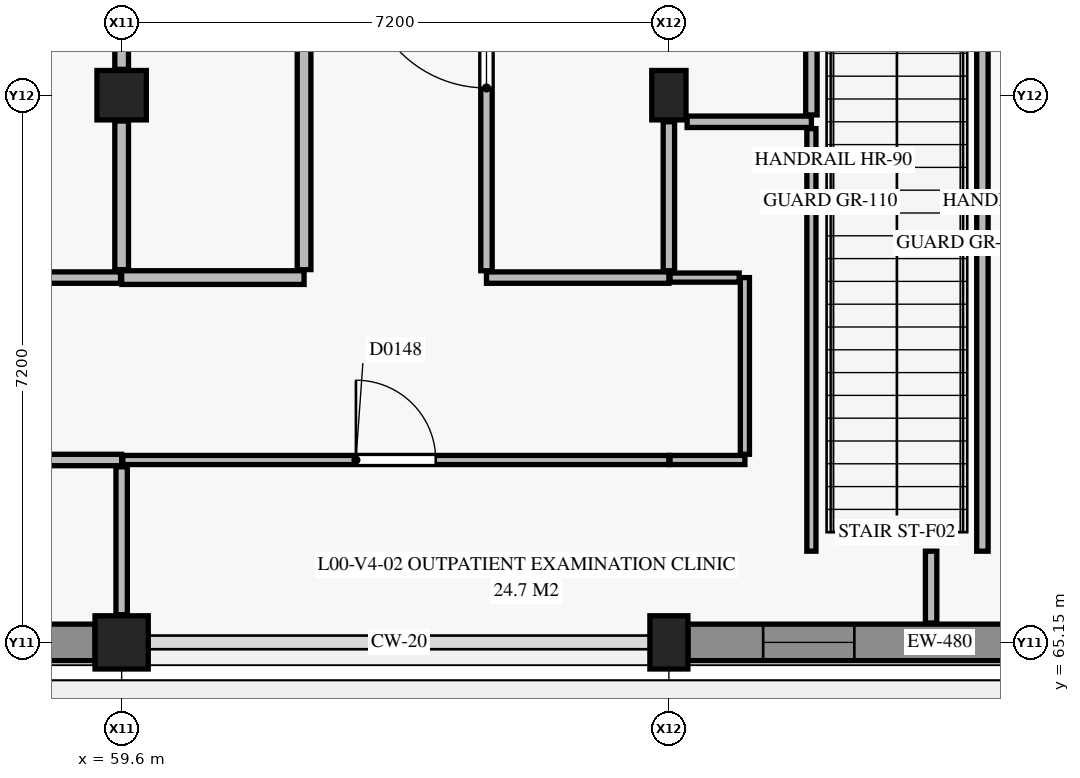
"""IFC4 building model, lengths in metres.
Left out: names, types, materials, properties, quantities, classifications, styles, units other than length and angle.
Written with IfcOpenShell. Run it as: python <this file> out.ifc"""

import sys

from ifc_helpers import new_model, si_unit, direction, frame, frame_2d, origin, origin_2d, place, context, subcontext, project, spatial, rectangle, extrude, element, fill, save


model = new_model("IFC4")
c1 = context("Model", 3, precision=1e-05, world=origin(), true_north=direction((0.0, 1.0)))
c2 = subcontext(c1, "Body", "Model", "MODEL_VIEW")
j1 = project(units=[si_unit("LENGTHUNIT", "METRE"), si_unit("PLANEANGLEUNIT", "RADIAN")], contexts=[c1])
p1 = place(None, origin())
s1 = spatial("IfcSite", under=j1, at=p1, CompositionType="ELEMENT")
p2 = place(p1, origin())
s2 = spatial("IfcBuilding", under=s1, at=p2, CompositionType="ELEMENT")
p3 = place(p2, origin())
s3 = spatial("IfcBuildingStorey", under=s2, at=p3, CompositionType="ELEMENT", Elevation=0.0)
p4 = place(p3, frame((59.6, 65.15, 0.0), z_axis=(0.0, 0.0, 1.0), x_axis=(1.0, 0.0, 0.0)))
e1 = element("IfcColumn", 1, at=p4, inside=s3, PredefinedType="COLUMN", context=c2, shape_type="SweptSolid", body=[
    extrude(rectangle(XDim=0.7, YDim=0.7, at=origin_2d()), origin(), (0.0, 0.0, 1.0), 4.8),
])
p5 = place(p3, frame((59.6, 72.35, 0.0), z_axis=(0.0, 0.0, 1.0), x_axis=(1.0, 0.0, 0.0)))
e2 = element("IfcColumn", 2, at=p5, inside=s3, PredefinedType="COLUMN", context=c2, shape_type="SweptSolid", body=[
    extrude(rectangle(XDim=0.65, YDim=0.65, at=origin_2d()), origin(), (0.0, 0.0, 1.0), 4.8),
])
p6 = place(p3, frame((66.8, 65.15, 0.0), z_axis=(0.0, 0.0, 1.0), x_axis=(1.0, 0.0, 0.0)))
e3 = element("IfcColumn", 3, at=p6, inside=s3, PredefinedType="COLUMN", context=c2, shape_type="SweptSolid", body=[
    extrude(rectangle(XDim=0.5, YDim=0.7, at=origin_2d()), origin(), (0.0, 0.0, 1.0), 4.8),
])
p7 = place(p3, frame((66.8, 72.35, 0.0), z_axis=(0.0, 0.0, 1.0), x_axis=(1.0, 0.0, 0.0)))
e4 = element("IfcColumn", 4, at=p7, inside=s3, PredefinedType="COLUMN", context=c2, shape_type="SweptSolid", body=[
    extrude(rectangle(XDim=0.45, YDim=0.65, at=origin_2d()), origin(), (0.0, 0.0, 1.0), 4.8),
])
p8 = place(p3, frame((73.675, 65.15, 0.0), z_axis=(0.0, 0.0, 1.0), x_axis=(-1.0, 0.0, 0.0)))
e5 = element("IfcWall", 5, at=p8, inside=s3, PredefinedType="SOLIDWALL", context=c2, shape_type="SweptSolid", body=[
    extrude(rectangle(XDim=6.625, YDim=0.48, at=frame_2d((3.312, 0.0))), origin(), (0.0, 0.0, 1.0), 3.73),
])
p9 = place(p8, frame((0.84, 0.0, 0.9)))
e6 = element("IfcOpeningElement", 6, at=p9, cuts=e5, PredefinedType="OPENING", context=c2, shape_type="SweptSolid", body=[
    extrude(rectangle(XDim=1.05, YDim=1.8, at=frame_2d((0.525, 0.9))), frame((0.0, 0.25, 0.0), z_axis=(0.0, -1.0, 0.0), x_axis=(1.0, 0.0, 0.0)), (0.0, 0.0, 1.0), 0.5),
])
p10 = place(p8, frame((4.435, 0.0, 0.9)))
e7 = element("IfcOpeningElement", 7, at=p10, cuts=e5, PredefinedType="OPENING", context=c2, shape_type="SweptSolid", body=[
    extrude(rectangle(XDim=1.2, YDim=1.8, at=frame_2d((0.6, 0.9))), frame((0.0, 0.25, 0.0), z_axis=(0.0, -1.0, 0.0), x_axis=(1.0, 0.0, 0.0)), (0.0, 0.0, 1.0), 0.5),
])
p11 = place(p3, frame((59.25, 65.15, 0.0), z_axis=(0.0, 0.0, 1.0), x_axis=(-1.0, 0.0, 0.0)))
e8 = element("IfcWall", 8, at=p11, inside=s3, PredefinedType="SOLIDWALL", context=c2, shape_type="SweptSolid", body=[
    extrude(rectangle(XDim=6.55, YDim=0.48, at=frame_2d((3.275, 0.0))), origin(), (0.0, 0.0, 1.0), 3.73),
])
p12 = place(p11, frame((0.79, 0.0, 0.9)))
e9 = element("IfcOpeningElement", 9, at=p12, cuts=e8, PredefinedType="OPENING", context=c2, shape_type="SweptSolid", body=[
    extrude(rectangle(XDim=1.4, YDim=1.8, at=frame_2d((0.7, 0.9))), frame((0.0, 0.25, 0.0), z_axis=(0.0, -1.0, 0.0), x_axis=(1.0, 0.0, 0.0)), (0.0, 0.0, 1.0), 0.5),
])
p13 = place(p11, frame((3.985, 0.0, 0.9)))
e10 = element("IfcOpeningElement", 10, at=p13, cuts=e8, PredefinedType="OPENING", context=c2, shape_type="SweptSolid", body=[
    extrude(rectangle(XDim=1.6, YDim=1.8, at=frame_2d((0.8, 0.9))), frame((0.0, 0.25, 0.0), z_axis=(0.0, -1.0, 0.0), x_axis=(1.0, 0.0, 0.0)), (0.0, 0.0, 1.0), 0.5),
])
p14 = place(p3, frame((59.6, 69.95, 0.0), z_axis=(0.0, 0.0, 1.0), x_axis=(1.0, 0.0, 0.0)))
e11 = element("IfcWall", 11, at=p14, inside=s3, PredefinedType="PLUMBINGWALL", context=c2, shape_type="SweptSolid", body=[
    extrude(rectangle(XDim=2.4, YDim=0.18, at=frame_2d((1.2, 0.0))), origin(), (0.0, 0.0, 1.0), 4.015),
])
p15 = place(p3, frame((62.0, 70.055, 0.0), z_axis=(0.0, 0.0, 1.0), x_axis=(0.0, 1.0, 0.0)))
e12 = element("IfcWall", 12, at=p15, inside=s3, PredefinedType="PLUMBINGWALL", context=c2, shape_type="SweptSolid", body=[
    extrude(rectangle(XDim=8.59, YDim=0.18, at=frame_2d((4.295, 0.0))), origin(), (0.0, 0.0, 1.0), 4.015),
])
p16 = place(p15, frame((3.82, 0.0, 0.0)))
e13 = element("IfcOpeningElement", 13, at=p16, cuts=e12, PredefinedType="OPENING", context=c2, shape_type="SweptSolid", body=[
    extrude(rectangle(XDim=0.95, YDim=2.1, at=frame_2d((0.475, 1.05))), frame((0.0, 0.1, 0.0), z_axis=(0.0, -1.0, 0.0), x_axis=(1.0, 0.0, 0.0)), (0.0, 0.0, 1.0), 0.2),
])
p17 = place(p3, frame((56.265, 67.55, 0.0), z_axis=(0.0, 0.0, 1.0), x_axis=(1.0, 0.0, 0.0)))
e14 = element("IfcWall", 14, at=p17, inside=s3, PredefinedType="PARTITIONING", context=c2, shape_type="SweptSolid", body=[
    extrude(rectangle(XDim=3.335, YDim=0.15, at=frame_2d((1.667, 0.0))), origin(), (0.0, 0.0, 1.0), 4.015),
])
p18 = place(p3, frame((57.2, 69.95, 0.0), z_axis=(0.0, 0.0, 1.0), x_axis=(1.0, 0.0, 0.0)))
e15 = element("IfcWall", 15, at=p18, inside=s3, PredefinedType="PARTITIONING", context=c2, shape_type="SweptSolid", body=[
    extrude(rectangle(XDim=2.385, YDim=0.15, at=frame_2d((1.192, 0.0))), origin(), (0.0, 0.0, 1.0), 4.015),
])
p19 = place(p3, frame((64.4, 69.95, 0.0), z_axis=(0.0, 0.0, 1.0), x_axis=(1.0, 0.0, 0.0)))
e16 = element("IfcWall", 16, at=p19, inside=s3, PredefinedType="PARTITIONING", context=c2, shape_type="SweptSolid", body=[
    extrude(rectangle(XDim=2.4, YDim=0.15, at=frame_2d((1.2, 0.0))), origin(), (0.0, 0.0, 1.0), 3.885),
])
p20 = place(p3, frame((64.4, 70.04, 0.0), z_axis=(0.0, 0.0, 1.0), x_axis=(0.0, 1.0, 0.0)))
e17 = element("IfcWall", 17, at=p20, inside=s3, PredefinedType="PARTITIONING", context=c2, shape_type="SweptSolid", body=[
    extrude(rectangle(XDim=6.41, YDim=0.15, at=frame_2d((3.205, 0.0))), origin(), (0.0, 0.0, 1.0), 4.015),
])
p21 = place(p20, frame((2.405, 0.0, 0.0)))
e18 = element("IfcOpeningElement", 18, at=p21, cuts=e17, PredefinedType="OPENING", context=c2, shape_type="SweptSolid", body=[
    extrude(rectangle(XDim=1.6, YDim=2.25, at=frame_2d((0.8, 1.125))), frame((0.0, 0.085, 0.0), z_axis=(0.0, -1.0, 0.0), x_axis=(1.0, 0.0, 0.0)), (0.0, 0.0, 1.0), 0.17),
])
p22 = place(p3, frame((59.615, 67.55, 0.0), z_axis=(0.0, 0.0, 1.0), x_axis=(1.0, 0.0, 0.0)))
e19 = element("IfcWall", 19, at=p22, inside=s3, PredefinedType="PARTITIONING", context=c2, shape_type="SweptSolid", body=[
    extrude(rectangle(XDim=7.185, YDim=0.12, at=frame_2d((3.593, 0.0))), origin(), (0.0, 0.0, 1.0), 3.885),
])
p23 = place(p22, frame((3.067, 0.0, 0.0)))
e20 = element("IfcOpeningElement", 20, at=p23, cuts=e19, PredefinedType="OPENING", context=c2, shape_type="SweptSolid", body=[
    extrude(rectangle(XDim=1.05, YDim=2.15, at=frame_2d((0.525, 1.075))), frame((0.0, 0.07, 0.0), z_axis=(0.0, -1.0, 0.0), x_axis=(1.0, 0.0, 0.0)), (0.0, 0.0, 1.0), 0.14),
])
p24 = place(p3, frame((66.815, 67.55, 0.0), z_axis=(0.0, 0.0, 1.0), x_axis=(1.0, 0.0, 0.0)))
e21 = element("IfcWall", 21, at=p24, inside=s3, PredefinedType="PARTITIONING", context=c2, shape_type="SweptSolid", body=[
    extrude(rectangle(XDim=0.985, YDim=0.12, at=frame_2d((0.493, 0.0))), origin(), (0.0, 0.0, 1.0), 3.885),
])
p25 = place(p3, frame((67.8, 67.625, 0.0), z_axis=(0.0, 0.0, 1.0), x_axis=(0.0, 1.0, 0.0)))
e22 = element("IfcWall", 22, at=p25, inside=s3, PredefinedType="PARTITIONING", context=c2, shape_type="SweptSolid", body=[
    extrude(rectangle(XDim=2.325, YDim=0.12, at=frame_2d((1.163, 0.0))), origin(), (0.0, 0.0, 1.0), 4.55),
])
p26 = place(p3, frame((66.815, 69.95, 0.0), z_axis=(0.0, 0.0, 1.0), x_axis=(1.0, 0.0, 0.0)))
e23 = element("IfcWall", 23, at=p26, inside=s3, PredefinedType="PARTITIONING", context=c2, shape_type="SweptSolid", body=[
    extrude(rectangle(XDim=0.91, YDim=0.12, at=frame_2d((0.455, 0.0))), origin(), (0.0, 0.0, 1.0), 3.885),
])
p27 = place(p3, frame((59.6, 70.055, 0.0), z_axis=(0.0, 0.0, 1.0), x_axis=(0.0, 1.0, 0.0)))
e24 = element("IfcWall", 24, at=p27, inside=s3, PredefinedType="PLUMBINGWALL", context=c2, shape_type="SweptSolid", body=[
    extrude(rectangle(XDim=1.955, YDim=0.18, at=frame_2d((0.978, 0.0))), origin(), (0.0, 0.0, 1.0), 4.015),
])
p28 = place(p3, frame((59.6, 72.69, 0.0), z_axis=(0.0, 0.0, 1.0), x_axis=(0.0, 1.0, 0.0)))
e25 = element("IfcWall", 25, at=p28, inside=s3, PredefinedType="PLUMBINGWALL", context=c2, shape_type="SweptSolid", body=[
    extrude(rectangle(XDim=6.545, YDim=0.18, at=frame_2d((3.272, 0.0))), origin(), (0.0, 0.0, 1.0), 4.055),
])
p29 = place(p3, frame((59.6, 65.515, 0.0), z_axis=(0.0, 0.0, 1.0), x_axis=(0.0, 1.0, 0.0)))
e26 = element("IfcWall", 26, at=p29, inside=s3, PredefinedType="PARTITIONING", context=c2, shape_type="SweptSolid", body=[
    extrude(rectangle(XDim=1.945, YDim=0.15, at=frame_2d((0.973, 0.0))), origin(), (0.0, 0.0, 1.0), 4.015),
])
p30 = place(p3, frame((66.8, 70.04, 0.0), z_axis=(0.0, 0.0, 1.0), x_axis=(0.0, 1.0, 0.0)))
e27 = element("IfcWall", 27, at=p30, inside=s3, PredefinedType="PARTITIONING", context=c2, shape_type="SweptSolid", body=[
    extrude(rectangle(XDim=1.96, YDim=0.15, at=frame_2d((0.98, 0.0))), origin(), (0.0, 0.0, 1.0), 3.885),
])
p31 = place(p3, frame((67.04, 72.0, 0.0), z_axis=(0.0, 0.0, 1.0), x_axis=(1.0, 0.0, 0.0)))
e28 = element("IfcWall", 28, at=p31, inside=s3, PredefinedType="PARTITIONING", context=c2, shape_type="SweptSolid", body=[
    extrude(rectangle(XDim=1.635, YDim=0.15, at=frame_2d((0.817, 0.0))), origin(), (0.0, 0.0, 1.0), 4.55),
])
p32 = place(p3, frame((70.25, 65.405, 0.0), z_axis=(0.0, 0.0, 1.0), x_axis=(0.0, 1.0, 0.0)))
e29 = element("IfcWall", 29, at=p32, inside=s3, PredefinedType="PARTITIONING", context=c2, shape_type="SweptSolid", body=[
    extrude(rectangle(XDim=0.945, YDim=0.15, at=frame_2d((0.473, 0.0))), origin(), (0.0, 0.0, 1.0), 4.55),
])
p33 = place(p3, frame((70.925, 66.35, 0.0), z_axis=(0.0, 0.0, 1.0), x_axis=(0.0, 1.0, 0.0)))
e30 = element("IfcWall", 30, at=p33, inside=s3, PredefinedType="PARTITIONING", context=c2, shape_type="SweptSolid", body=[
    extrude(rectangle(XDim=8.983, YDim=0.15, at=frame_2d((4.491, 0.0))), origin(), (0.0, 0.0, 1.0), 4.55),
])
p34 = place(p3, frame((68.675, 72.09, 0.0), z_axis=(0.0, 0.0, 1.0), x_axis=(0.0, 1.0, 0.0)))
e31 = element("IfcWall", 31, at=p34, inside=s3, PredefinedType="PARTITIONING", context=c2, shape_type="SweptSolid", body=[
    extrude(rectangle(XDim=3.243, YDim=0.15, at=frame_2d((1.622, 0.0))), origin(), (0.0, 0.0, 1.0), 4.55),
])
p35 = place(p3, frame((68.675, 66.35, 0.0), z_axis=(0.0, 0.0, 1.0), x_axis=(0.0, 1.0, 0.0)))
e32 = element("IfcWall", 32, at=p35, inside=s3, PredefinedType="PARTITIONING", context=c2, shape_type="SweptSolid", body=[
    extrude(rectangle(XDim=5.56, YDim=0.12, at=frame_2d((2.78, 0.0))), origin(), (0.0, 0.0, 1.0), 4.55),
])
p36 = place(p10, origin())
e33 = element("IfcWindow", 33, at=p36, inside=s3, PartitioningType="SINGLE_PANEL", PredefinedType="WINDOW", context=c2, shape_type="SweptSolid", body=[
    extrude(rectangle(XDim=1.2, YDim=1.8, at=frame_2d((0.6, 0.9))), frame((0.0, 0.03, 0.0), z_axis=(0.0, -1.0, 0.0), x_axis=(1.0, 0.0, 0.0)), (0.0, 0.0, 1.0), 0.06),
])
fill(e7, e33)
p37 = place(p23, origin())
e34 = element("IfcDoor", 34, at=p37, inside=s3, OperationType="SINGLE_SWING_LEFT", PredefinedType="DOOR", context=c2, shape_type="SweptSolid", body=[
    extrude(rectangle(XDim=1.05, YDim=2.15, at=frame_2d((0.525, 1.075))), frame((0.0, 0.025, 0.0), z_axis=(0.0, -1.0, 0.0), x_axis=(1.0, 0.0, 0.0)), (0.0, 0.0, 1.0), 0.05),
])
fill(e20, e34)
p38 = place(p21, origin())
e35 = element("IfcDoor", 35, at=p38, inside=s3, OperationType="SINGLE_SWING_RIGHT", PredefinedType="DOOR", context=c2, shape_type="SweptSolid", body=[
    extrude(rectangle(XDim=1.6, YDim=2.25, at=frame_2d((0.8, 1.125))), frame((0.0, 0.025, 0.0), z_axis=(0.0, -1.0, 0.0), x_axis=(1.0, 0.0, 0.0)), (0.0, 0.0, 1.0), 0.05),
])
fill(e18, e35)
save(model, sys.argv[1])
